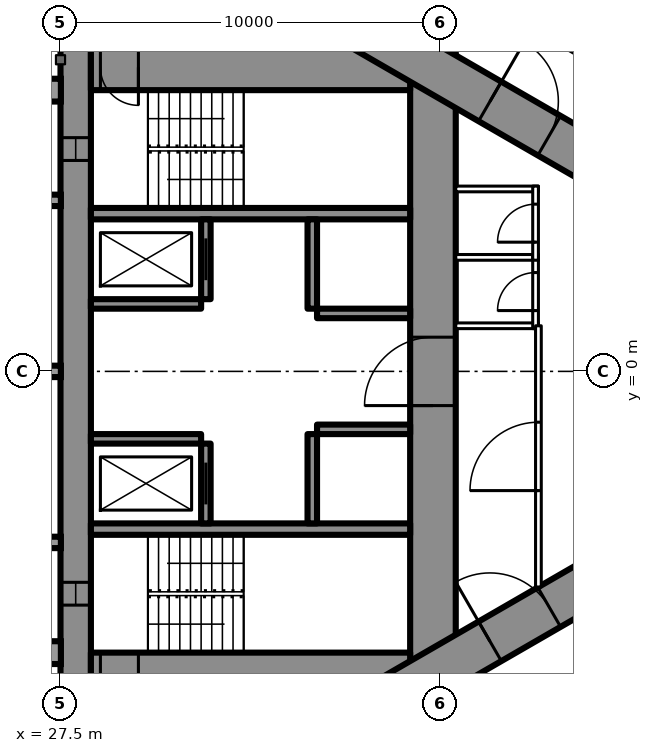
"""IFC4 building model, lengths in metres.
Left out: names, types, materials, properties, quantities, classifications, styles, units other than length and angle.
Written with IfcOpenShell. Run it as: python <this file> out.ifc"""

import sys

from ifc_helpers import new_model, si_unit, direction, frame, frame_2d, origin, place, context, subcontext, project, spatial, rectangle, extrude, element, fill, save


model = new_model("IFC4")
c1 = context("Model", 3, precision=1e-05, world=origin(), true_north=direction((0.0, 1.0)))
c2 = subcontext(c1, "Body", "Model", "MODEL_VIEW")
j1 = project(units=[si_unit("LENGTHUNIT", "METRE"), si_unit("PLANEANGLEUNIT", "RADIAN")], contexts=[c1])
p1 = place(None, origin())
s1 = spatial("IfcSite", under=j1, at=p1, CompositionType="ELEMENT")
p2 = place(p1, origin())
s2 = spatial("IfcBuilding", under=s1, at=p2, CompositionType="ELEMENT")
p3 = place(p2, frame((0.0, 0.0, 53.0)))
s3 = spatial("IfcBuildingStorey", under=s2, at=p3, CompositionType="ELEMENT", Elevation=53.0)
p4 = place(p3, frame((27.9, -8.6, 0.0), z_axis=(0.0, 0.0, 1.0), x_axis=(0.0, 1.0, 0.0)))
e1 = element("IfcWall", 1, at=p4, inside=s3, PredefinedType="SHEAR", context=c2, shape_type="SweptSolid", body=[
    extrude(rectangle(XDim=17.2, YDim=0.8, at=frame_2d((8.6, 0.0))), origin(), (0.0, 0.0, 1.0), 3.5),
])
p5 = place(p4, frame((2.45, 0.0, 0.6)))
e2 = element("IfcOpeningElement", 2, at=p5, cuts=e1, PredefinedType="OPENING", context=c2, shape_type="SweptSolid", body=[
    extrude(rectangle(XDim=0.6, YDim=2.1, at=frame_2d((0.3, 1.05))), frame((0.0, 0.41, 0.0), z_axis=(0.0, -1.0, 0.0), x_axis=(1.0, 0.0, 0.0)), (0.0, 0.0, 1.0), 0.82),
])
p6 = place(p4, frame((14.15, 0.0, 0.6)))
e3 = element("IfcOpeningElement", 3, at=p6, cuts=e1, PredefinedType="OPENING", context=c2, shape_type="SweptSolid", body=[
    extrude(rectangle(XDim=0.6, YDim=2.1, at=frame_2d((0.3, 1.05))), frame((0.0, 0.41, 0.0), z_axis=(0.0, -1.0, 0.0), x_axis=(1.0, 0.0, 0.0)), (0.0, 0.0, 1.0), 0.82),
])
p7 = place(p3, frame((37.3, -8.6, 0.0), z_axis=(0.0, 0.0, 1.0), x_axis=(0.0, 1.0, 0.0)))
e4 = element("IfcWall", 4, at=p7, inside=s3, PredefinedType="SHEAR", context=c2, shape_type="SweptSolid", body=[
    extrude(rectangle(XDim=17.2, YDim=1.2, at=frame_2d((8.6, 0.0))), origin(), (0.0, 0.0, 1.0), 3.5),
])
p8 = place(p7, frame((7.7, 0.0, 0.0)))
e5 = element("IfcOpeningElement", 5, at=p8, cuts=e4, PredefinedType="OPENING", context=c2, shape_type="SweptSolid", body=[
    extrude(rectangle(XDim=1.8, YDim=2.2, at=frame_2d((0.9, 1.1))), frame((0.0, 0.61, 0.0), z_axis=(0.0, -1.0, 0.0), x_axis=(1.0, 0.0, 0.0)), (0.0, 0.0, 1.0), 1.22),
])
p9 = place(p3, frame((28.3, -8.0, 0.0), z_axis=(0.0, 0.0, 1.0), x_axis=(1.0, 0.0, 0.0)))
e6 = element("IfcWall", 6, at=p9, inside=s3, PredefinedType="SHEAR", context=c2, shape_type="SweptSolid", body=[
    extrude(rectangle(XDim=8.4, YDim=1.2, at=frame_2d((4.2, 0.0))), origin(), (0.0, 0.0, 1.0), 3.5),
])
p10 = place(p9, frame((0.25, 0.0, 0.0)))
e7 = element("IfcOpeningElement", 7, at=p10, cuts=e6, PredefinedType="OPENING", context=c2, shape_type="SweptSolid", body=[
    extrude(rectangle(XDim=1.0, YDim=2.2, at=frame_2d((0.5, 1.1))), frame((0.0, 0.61, 0.0), z_axis=(0.0, -1.0, 0.0), x_axis=(1.0, 0.0, 0.0)), (0.0, 0.0, 1.0), 1.22),
])
p11 = place(p3, frame((28.3, 8.0, 0.0), z_axis=(0.0, 0.0, 1.0), x_axis=(1.0, 0.0, 0.0)))
e8 = element("IfcWall", 8, at=p11, inside=s3, PredefinedType="SHEAR", context=c2, shape_type="SweptSolid", body=[
    extrude(rectangle(XDim=8.4, YDim=1.2, at=frame_2d((4.2, 0.0))), origin(), (0.0, 0.0, 1.0), 3.5),
])
p12 = place(p11, frame((0.25, 0.0, 0.0)))
e9 = element("IfcOpeningElement", 9, at=p12, cuts=e8, PredefinedType="OPENING", context=c2, shape_type="SweptSolid", body=[
    extrude(rectangle(XDim=1.0, YDim=2.2, at=frame_2d((0.5, 1.1))), frame((0.0, 0.61, 0.0), z_axis=(0.0, -1.0, 0.0), x_axis=(1.0, 0.0, 0.0)), (0.0, 0.0, 1.0), 1.22),
])
for number, where, z_axis, x_axis in (
    (10, (28.3, -4.15, 0.0), (0.0, 0.0, 1.0), (1.0, 0.0, 0.0)),
    (11, (28.3, 4.15, 0.0), (0.0, 0.0, 1.0), (1.0, 0.0, 0.0)),
):
    element("IfcWall", number, at=place(p3, frame(where, z_axis=z_axis, x_axis=x_axis)), inside=s3, PredefinedType="SHEAR", context=c2, shape_type="SweptSolid", body=[
        extrude(rectangle(XDim=8.4, YDim=0.3, at=frame_2d((4.2, 0.0))), origin(), (0.0, 0.0, 1.0), 3.5),
    ])
p13 = place(p3, frame((31.325, -4.0, 0.0), z_axis=(0.0, 0.0, 1.0), x_axis=(0.0, 1.0, 0.0)))
e12 = element("IfcWall", 12, at=p13, inside=s3, PredefinedType="SHEAR", context=c2, shape_type="SweptSolid", body=[
    extrude(rectangle(XDim=2.1, YDim=0.25, at=frame_2d((1.05, 0.0))), origin(), (0.0, 0.0, 1.0), 3.5),
])
p14 = place(p13, frame((0.5, 0.0, 0.0)))
e13 = element("IfcOpeningElement", 13, at=p14, cuts=e12, PredefinedType="OPENING", context=c2, shape_type="SweptSolid", body=[
    extrude(rectangle(XDim=1.1, YDim=2.2, at=frame_2d((0.55, 1.1))), frame((0.0, 0.135, 0.0), z_axis=(0.0, -1.0, 0.0), x_axis=(1.0, 0.0, 0.0)), (0.0, 0.0, 1.0), 0.27),
])
p15 = place(p3, frame((34.125, -4.0, 0.0), z_axis=(0.0, 0.0, 1.0), x_axis=(0.0, 1.0, 0.0)))
e14 = element("IfcWall", 14, at=p15, inside=s3, PredefinedType="SHEAR", context=c2, shape_type="SweptSolid", body=[
    extrude(rectangle(XDim=2.35, YDim=0.25, at=frame_2d((1.175, 0.0))), origin(), (0.0, 0.0, 1.0), 3.5),
])
p16 = place(p3, frame((28.3, -1.775, 0.0), z_axis=(0.0, 0.0, 1.0), x_axis=(1.0, 0.0, 0.0)))
e15 = element("IfcWall", 15, at=p16, inside=s3, PredefinedType="SHEAR", context=c2, shape_type="SweptSolid", body=[
    extrude(rectangle(XDim=2.9, YDim=0.25, at=frame_2d((1.45, 0.0))), origin(), (0.0, 0.0, 1.0), 3.5),
])
p17 = place(p3, frame((34.25, -1.525, 0.0), z_axis=(0.0, 0.0, 1.0), x_axis=(1.0, 0.0, 0.0)))
e16 = element("IfcWall", 16, at=p17, inside=s3, PredefinedType="SHEAR", context=c2, shape_type="SweptSolid", body=[
    extrude(rectangle(XDim=2.45, YDim=0.25, at=frame_2d((1.225, 0.0))), origin(), (0.0, 0.0, 1.0), 3.5),
])
p18 = place(p3, frame((31.325, 1.9, 0.0), z_axis=(0.0, 0.0, 1.0), x_axis=(0.0, 1.0, 0.0)))
e17 = element("IfcWall", 17, at=p18, inside=s3, PredefinedType="SHEAR", context=c2, shape_type="SweptSolid", body=[
    extrude(rectangle(XDim=2.1, YDim=0.25, at=frame_2d((1.05, 0.0))), origin(), (0.0, 0.0, 1.0), 3.5),
])
p19 = place(p18, frame((0.5, 0.0, 0.0)))
e18 = element("IfcOpeningElement", 18, at=p19, cuts=e17, PredefinedType="OPENING", context=c2, shape_type="SweptSolid", body=[
    extrude(rectangle(XDim=1.1, YDim=2.2, at=frame_2d((0.55, 1.1))), frame((0.0, 0.135, 0.0), z_axis=(0.0, -1.0, 0.0), x_axis=(1.0, 0.0, 0.0)), (0.0, 0.0, 1.0), 0.27),
])
p20 = place(p3, frame((34.125, 1.65, 0.0), z_axis=(0.0, 0.0, 1.0), x_axis=(0.0, 1.0, 0.0)))
e19 = element("IfcWall", 19, at=p20, inside=s3, PredefinedType="SHEAR", context=c2, shape_type="SweptSolid", body=[
    extrude(rectangle(XDim=2.35, YDim=0.25, at=frame_2d((1.175, 0.0))), origin(), (0.0, 0.0, 1.0), 3.5),
])
p21 = place(p3, frame((28.3, 1.775, 0.0), z_axis=(0.0, 0.0, 1.0), x_axis=(1.0, 0.0, 0.0)))
e20 = element("IfcWall", 20, at=p21, inside=s3, PredefinedType="SHEAR", context=c2, shape_type="SweptSolid", body=[
    extrude(rectangle(XDim=2.9, YDim=0.25, at=frame_2d((1.45, 0.0))), origin(), (0.0, 0.0, 1.0), 3.5),
])
p22 = place(p3, frame((34.25, 1.525, 0.0), z_axis=(0.0, 0.0, 1.0), x_axis=(1.0, 0.0, 0.0)))
e21 = element("IfcWall", 21, at=p22, inside=s3, PredefinedType="SHEAR", context=c2, shape_type="SweptSolid", body=[
    extrude(rectangle(XDim=2.45, YDim=0.25, at=frame_2d((1.225, 0.0))), origin(), (0.0, 0.0, 1.0), 3.5),
])
p23 = place(p3, frame((27.2, -13.8, 0.0), z_axis=(0.0, 0.0, 1.0), x_axis=(0.866027159892, 0.499996958321, 0.0)))
e22 = element("IfcWall", 22, at=p23, inside=s3, PredefinedType="SHEAR", context=c2, shape_type="SweptSolid", body=[
    extrude(rectangle(XDim=27.947, YDim=1.2, at=frame_2d((13.973, 0.0))), origin(), (0.0, 0.0, 1.0), 3.5),
])
p24 = place(p23, frame((4.6, 0.0, 0.0)))
e23 = element("IfcOpeningElement", 23, at=p24, cuts=e22, PredefinedType="OPENING", context=c2, shape_type="SweptSolid", body=[
    extrude(rectangle(XDim=1.0, YDim=2.2, at=frame_2d((0.5, 1.1))), frame((0.0, 0.61, 0.0), z_axis=(0.0, -1.0, 0.0), x_axis=(1.0, 0.0, 0.0)), (0.0, 0.0, 1.0), 1.22),
])
p25 = place(p23, frame((13.395, 0.0, 0.0)))
e24 = element("IfcOpeningElement", 24, at=p25, cuts=e22, PredefinedType="OPENING", context=c2, shape_type="SweptSolid", body=[
    extrude(rectangle(XDim=1.8, YDim=2.2, at=frame_2d((0.9, 1.1))), frame((0.0, 0.61, 0.0), z_axis=(0.0, -1.0, 0.0), x_axis=(1.0, 0.0, 0.0)), (0.0, 0.0, 1.0), 1.22),
])
p26 = place(p3, frame((27.2, 13.8, 0.0), z_axis=(0.0, 0.0, 1.0), x_axis=(0.866024515034, -0.500001539357, 0.0)))
e25 = element("IfcWall", 25, at=p26, inside=s3, PredefinedType="SHEAR", context=c2, shape_type="SweptSolid", body=[
    extrude(rectangle(XDim=26.907, YDim=1.2, at=frame_2d((13.454, 0.0))), origin(), (0.0, 0.0, 1.0), 3.5),
])
p27 = place(p26, frame((4.6, 0.0, 0.0)))
e26 = element("IfcOpeningElement", 26, at=p27, cuts=e25, PredefinedType="OPENING", context=c2, shape_type="SweptSolid", body=[
    extrude(rectangle(XDim=1.0, YDim=2.2, at=frame_2d((0.5, 1.1))), frame((0.0, 0.61, 0.0), z_axis=(0.0, -1.0, 0.0), x_axis=(1.0, 0.0, 0.0)), (0.0, 0.0, 1.0), 1.22),
])
p28 = place(p26, frame((13.395, 0.0, 0.0)))
e27 = element("IfcOpeningElement", 27, at=p28, cuts=e25, PredefinedType="OPENING", context=c2, shape_type="SweptSolid", body=[
    extrude(rectangle(XDim=1.8, YDim=2.2, at=frame_2d((0.9, 1.1))), frame((0.0, 0.61, 0.0), z_axis=(0.0, -1.0, 0.0), x_axis=(1.0, 0.0, 0.0)), (0.0, 0.0, 1.0), 1.22),
])
p29 = place(p3, frame((37.96, -10.243, 0.0), z_axis=(0.0, 0.0, 1.0), x_axis=(0.866026429433, 0.499998223521, 0.0)))
e28 = element("IfcWall", 28, at=p29, inside=s3, PredefinedType="PARTITIONING", context=c2, shape_type="SweptSolid", body=[
    extrude(rectangle(XDim=20.487, YDim=0.2, at=frame_2d((10.243, 0.0))), origin(), (0.0, 0.0, 1.0), 3.25),
])
p30 = place(p29, frame((6.925, 0.0, 0.0)))
e29 = element("IfcOpeningElement", 29, at=p30, cuts=e28, PredefinedType="OPENING", context=c2, shape_type="SweptSolid", body=[
    extrude(rectangle(XDim=0.95, YDim=2.2, at=frame_2d((0.475, 1.1))), frame((0.0, 0.11, 0.0), z_axis=(0.0, -1.0, 0.0), x_axis=(1.0, 0.0, 0.0)), (0.0, 0.0, 1.0), 0.22),
])
p31 = place(p29, frame((11.549, 0.0, 0.0)))
e30 = element("IfcOpeningElement", 30, at=p31, cuts=e28, PredefinedType="OPENING", context=c2, shape_type="SweptSolid", body=[
    extrude(rectangle(XDim=0.95, YDim=2.2, at=frame_2d((0.475, 1.1))), frame((0.0, 0.11, 0.0), z_axis=(0.0, -1.0, 0.0), x_axis=(1.0, 0.0, 0.0)), (0.0, 0.0, 1.0), 0.22),
])
p32 = place(p29, frame((13.249, 0.0, 0.0)))
e31 = element("IfcOpeningElement", 31, at=p32, cuts=e28, PredefinedType="OPENING", context=c2, shape_type="SweptSolid", body=[
    extrude(rectangle(XDim=0.95, YDim=2.2, at=frame_2d((0.475, 1.1))), frame((0.0, 0.11, 0.0), z_axis=(0.0, -1.0, 0.0), x_axis=(1.0, 0.0, 0.0)), (0.0, 0.0, 1.0), 0.22),
])
p33 = place(p29, frame((17.585, 0.0, 0.0)))
e32 = element("IfcOpeningElement", 32, at=p33, cuts=e28, PredefinedType="OPENING", context=c2, shape_type="SweptSolid", body=[
    extrude(rectangle(XDim=0.95, YDim=2.2, at=frame_2d((0.475, 1.1))), frame((0.0, 0.11, 0.0), z_axis=(0.0, -1.0, 0.0), x_axis=(1.0, 0.0, 0.0)), (0.0, 0.0, 1.0), 0.22),
])
p34 = place(p29, frame((0.6, 0.0, 0.0)))
e33 = element("IfcOpeningElement", 33, at=p34, cuts=e28, PredefinedType="OPENING", context=c2, shape_type="SweptSolid", body=[
    extrude(rectangle(XDim=0.95, YDim=2.2, at=frame_2d((0.475, 1.1))), frame((0.0, 0.11, 0.0), z_axis=(0.0, -1.0, 0.0), x_axis=(1.0, 0.0, 0.0)), (0.0, 0.0, 1.0), 0.22),
])
p35 = place(p3, frame((36.834, 10.894, 0.0), z_axis=(0.0, 0.0, 1.0), x_axis=(0.866031136856, -0.499990069898, 0.0)))
e34 = element("IfcWall", 34, at=p35, inside=s3, PredefinedType="PARTITIONING", context=c2, shape_type="SweptSolid", body=[
    extrude(rectangle(XDim=5.475, YDim=0.2, at=frame_2d((2.738, 0.0))), origin(), (0.0, 0.0, 1.0), 3.25),
])
p36 = place(p35, frame((1.542, 0.0, 0.0)))
e35 = element("IfcOpeningElement", 35, at=p36, cuts=e34, PredefinedType="OPENING", context=c2, shape_type="SweptSolid", body=[
    extrude(rectangle(XDim=0.95, YDim=2.2, at=frame_2d((0.475, 1.1))), frame((0.0, 0.11, 0.0), z_axis=(0.0, -1.0, 0.0), x_axis=(1.0, 0.0, 0.0)), (0.0, 0.0, 1.0), 0.22),
])
p37 = place(p35, frame((0.246, 0.0, 0.0)))
e36 = element("IfcOpeningElement", 36, at=p37, cuts=e34, PredefinedType="OPENING", context=c2, shape_type="SweptSolid", body=[
    extrude(rectangle(XDim=0.9, YDim=2.2, at=frame_2d((0.45, 1.1))), frame((0.0, 0.11, 0.0), z_axis=(0.0, -1.0, 0.0), x_axis=(1.0, 0.0, 0.0)), (0.0, 0.0, 1.0), 0.22),
])
for number, where, z_axis, x_axis in (
    (37, (37.9, 1.2, 0.0), (0.0, 0.0, 1.0), (1.0, 0.0, 0.0)),
    (38, (37.9, 3.0, 0.0), (0.0, 0.0, 1.0), (1.0, 0.0, 0.0)),
    (39, (37.9, 4.8, 0.0), (0.0, 0.0, 1.0), (1.0, 0.0, 0.0)),
):
    element("IfcWall", number, at=place(p3, frame(where, z_axis=z_axis, x_axis=x_axis)), inside=s3, PredefinedType="PARTITIONING", context=c2, shape_type="SweptSolid", body=[
        extrude(rectangle(XDim=2.175, YDim=0.15, at=frame_2d((1.087, 0.0))), origin(), (0.0, 0.0, 1.0), 3.25),
    ])
p38 = place(p3, frame((40.0, 1.125, 0.0), z_axis=(0.0, 0.0, 1.0), x_axis=(0.0, 1.0, 0.0)))
e40 = element("IfcWall", 40, at=p38, inside=s3, PredefinedType="PARTITIONING", context=c2, shape_type="SweptSolid", body=[
    extrude(rectangle(XDim=1.95, YDim=0.15, at=frame_2d((0.975, 0.0))), origin(), (0.0, 0.0, 1.0), 3.25),
])
p39 = place(p38, frame((0.475, 0.0, 0.0)))
e41 = element("IfcOpeningElement", 41, at=p39, cuts=e40, PredefinedType="OPENING", context=c2, shape_type="SweptSolid", body=[
    extrude(rectangle(XDim=1.0, YDim=2.2, at=frame_2d((0.5, 1.1))), frame((0.0, 0.085, 0.0), z_axis=(0.0, -1.0, 0.0), x_axis=(1.0, 0.0, 0.0)), (0.0, 0.0, 1.0), 0.17),
])
p40 = place(p3, frame((40.0, 2.925, 0.0), z_axis=(0.0, 0.0, 1.0), x_axis=(0.0, 1.0, 0.0)))
e42 = element("IfcWall", 42, at=p40, inside=s3, PredefinedType="PARTITIONING", context=c2, shape_type="SweptSolid", body=[
    extrude(rectangle(XDim=1.95, YDim=0.15, at=frame_2d((0.975, 0.0))), origin(), (0.0, 0.0, 1.0), 3.25),
])
p41 = place(p40, frame((0.475, 0.0, 0.0)))
e43 = element("IfcOpeningElement", 43, at=p41, cuts=e42, PredefinedType="OPENING", context=c2, shape_type="SweptSolid", body=[
    extrude(rectangle(XDim=1.0, YDim=2.2, at=frame_2d((0.5, 1.1))), frame((0.0, 0.085, 0.0), z_axis=(0.0, -1.0, 0.0), x_axis=(1.0, 0.0, 0.0)), (0.0, 0.0, 1.0), 0.17),
])
p42 = place(p3, frame((40.075, -5.674, 0.0), z_axis=(0.0, 0.0, 1.0), x_axis=(0.0, 1.0, 0.0)))
e44 = element("IfcWall", 44, at=p42, inside=s3, PredefinedType="PARTITIONING", context=c2, shape_type="SweptSolid", body=[
    extrude(rectangle(XDim=6.874, YDim=0.15, at=frame_2d((3.437, 0.0))), origin(), (0.0, 0.0, 1.0), 3.25),
])
p43 = place(p42, frame((2.537, 0.0, 0.0)))
e45 = element("IfcOpeningElement", 45, at=p43, cuts=e44, PredefinedType="OPENING", context=c2, shape_type="SweptSolid", body=[
    extrude(rectangle(XDim=1.8, YDim=2.2, at=frame_2d((0.9, 1.1))), frame((0.0, 0.085, 0.0), z_axis=(0.0, -1.0, 0.0), x_axis=(1.0, 0.0, 0.0)), (0.0, 0.0, 1.0), 0.17),
])
p44 = place(p39, origin())
e46 = element("IfcDoor", 46, at=p44, inside=s3, OperationType="SINGLE_SWING_LEFT", PredefinedType="DOOR", context=c2, shape_type="SweptSolid", body=[
    extrude(rectangle(XDim=1.0, YDim=2.2, at=frame_2d((0.5, 1.1))), frame((0.0, 0.025, 0.0), z_axis=(0.0, -1.0, 0.0), x_axis=(1.0, 0.0, 0.0)), (0.0, 0.0, 1.0), 0.05),
])
fill(e41, e46)
p45 = place(p41, origin())
e47 = element("IfcDoor", 47, at=p45, inside=s3, OperationType="SINGLE_SWING_LEFT", PredefinedType="DOOR", context=c2, shape_type="SweptSolid", body=[
    extrude(rectangle(XDim=1.0, YDim=2.2, at=frame_2d((0.5, 1.1))), frame((0.0, 0.025, 0.0), z_axis=(0.0, -1.0, 0.0), x_axis=(1.0, 0.0, 0.0)), (0.0, 0.0, 1.0), 0.05),
])
fill(e43, e47)
p46 = place(p43, origin())
e48 = element("IfcDoor", 48, at=p46, inside=s3, OperationType="DOUBLE_DOOR_SINGLE_SWING", PredefinedType="DOOR", context=c2, shape_type="SweptSolid", body=[
    extrude(rectangle(XDim=1.8, YDim=2.2, at=frame_2d((0.9, 1.1))), frame((0.0, 0.025, 0.0), z_axis=(0.0, -1.0, 0.0), x_axis=(1.0, 0.0, 0.0)), (0.0, 0.0, 1.0), 0.05),
])
fill(e45, e48)
p47 = place(p25, origin())
e49 = element("IfcDoor", 49, at=p47, inside=s3, OperationType="DOUBLE_DOOR_SINGLE_SWING", PredefinedType="DOOR", context=c2, shape_type="SweptSolid", body=[
    extrude(rectangle(XDim=1.8, YDim=2.2, at=frame_2d((0.9, 1.1))), frame((0.0, 0.025, 0.0), z_axis=(0.0, -1.0, 0.0), x_axis=(1.0, 0.0, 0.0)), (0.0, 0.0, 1.0), 0.05),
])
fill(e24, e49)
p48 = place(p28, origin())
e50 = element("IfcDoor", 50, at=p48, inside=s3, OperationType="DOUBLE_DOOR_SINGLE_SWING", PredefinedType="DOOR", context=c2, shape_type="SweptSolid", body=[
    extrude(rectangle(XDim=1.8, YDim=2.2, at=frame_2d((0.9, 1.1))), frame((0.0, 0.025, 0.0), z_axis=(0.0, -1.0, 0.0), x_axis=(1.0, 0.0, 0.0)), (0.0, 0.0, 1.0), 0.05),
])
fill(e27, e50)
p49 = place(p8, origin())
e51 = element("IfcDoor", 51, at=p49, inside=s3, OperationType="DOUBLE_DOOR_SINGLE_SWING", PredefinedType="DOOR", context=c2, shape_type="SweptSolid", body=[
    extrude(rectangle(XDim=1.8, YDim=2.2, at=frame_2d((0.9, 1.1))), frame((0.0, 0.025, 0.0), z_axis=(0.0, -1.0, 0.0), x_axis=(1.0, 0.0, 0.0)), (0.0, 0.0, 1.0), 0.05),
])
fill(e5, e51)
p50 = place(p12, origin())
e52 = element("IfcDoor", 52, at=p50, inside=s3, OperationType="SINGLE_SWING_RIGHT", PredefinedType="DOOR", context=c2, shape_type="SweptSolid", body=[
    extrude(rectangle(XDim=1.0, YDim=2.2, at=frame_2d((0.5, 1.1))), frame((0.0, 0.025, 0.0), z_axis=(0.0, -1.0, 0.0), x_axis=(1.0, 0.0, 0.0)), (0.0, 0.0, 1.0), 0.05),
])
fill(e9, e52)
p51 = place(p14, origin())
e53 = element("IfcDoor", 53, at=p51, inside=s3, OperationType="SLIDING_TO_LEFT", PredefinedType="USERDEFINED", context=c2, shape_type="SweptSolid", body=[
    extrude(rectangle(XDim=1.1, YDim=2.2, at=frame_2d((0.55, 1.1))), frame((0.0, 0.025, 0.0), z_axis=(0.0, -1.0, 0.0), x_axis=(1.0, 0.0, 0.0)), (0.0, 0.0, 1.0), 0.05),
])
fill(e13, e53)
p52 = place(p19, origin())
e54 = element("IfcDoor", 54, at=p52, inside=s3, OperationType="SLIDING_TO_LEFT", PredefinedType="USERDEFINED", context=c2, shape_type="SweptSolid", body=[
    extrude(rectangle(XDim=1.1, YDim=2.2, at=frame_2d((0.55, 1.1))), frame((0.0, 0.025, 0.0), z_axis=(0.0, -1.0, 0.0), x_axis=(1.0, 0.0, 0.0)), (0.0, 0.0, 1.0), 0.05),
])
fill(e18, e54)
p53 = place(p5, origin())
e55 = element("IfcWindow", 55, at=p53, inside=s3, PartitioningType="SINGLE_PANEL", PredefinedType="WINDOW", context=c2, shape_type="SweptSolid", body=[
    extrude(rectangle(XDim=0.6, YDim=2.1, at=frame_2d((0.3, 1.05))), frame((0.0, 0.03, 0.0), z_axis=(0.0, -1.0, 0.0), x_axis=(1.0, 0.0, 0.0)), (0.0, 0.0, 1.0), 0.06),
])
fill(e2, e55)
p54 = place(p6, origin())
e56 = element("IfcWindow", 56, at=p54, inside=s3, PartitioningType="SINGLE_PANEL", PredefinedType="WINDOW", context=c2, shape_type="SweptSolid", body=[
    extrude(rectangle(XDim=0.6, YDim=2.1, at=frame_2d((0.3, 1.05))), frame((0.0, 0.03, 0.0), z_axis=(0.0, -1.0, 0.0), x_axis=(1.0, 0.0, 0.0)), (0.0, 0.0, 1.0), 0.06),
])
fill(e3, e56)
save(model, sys.argv[1])
